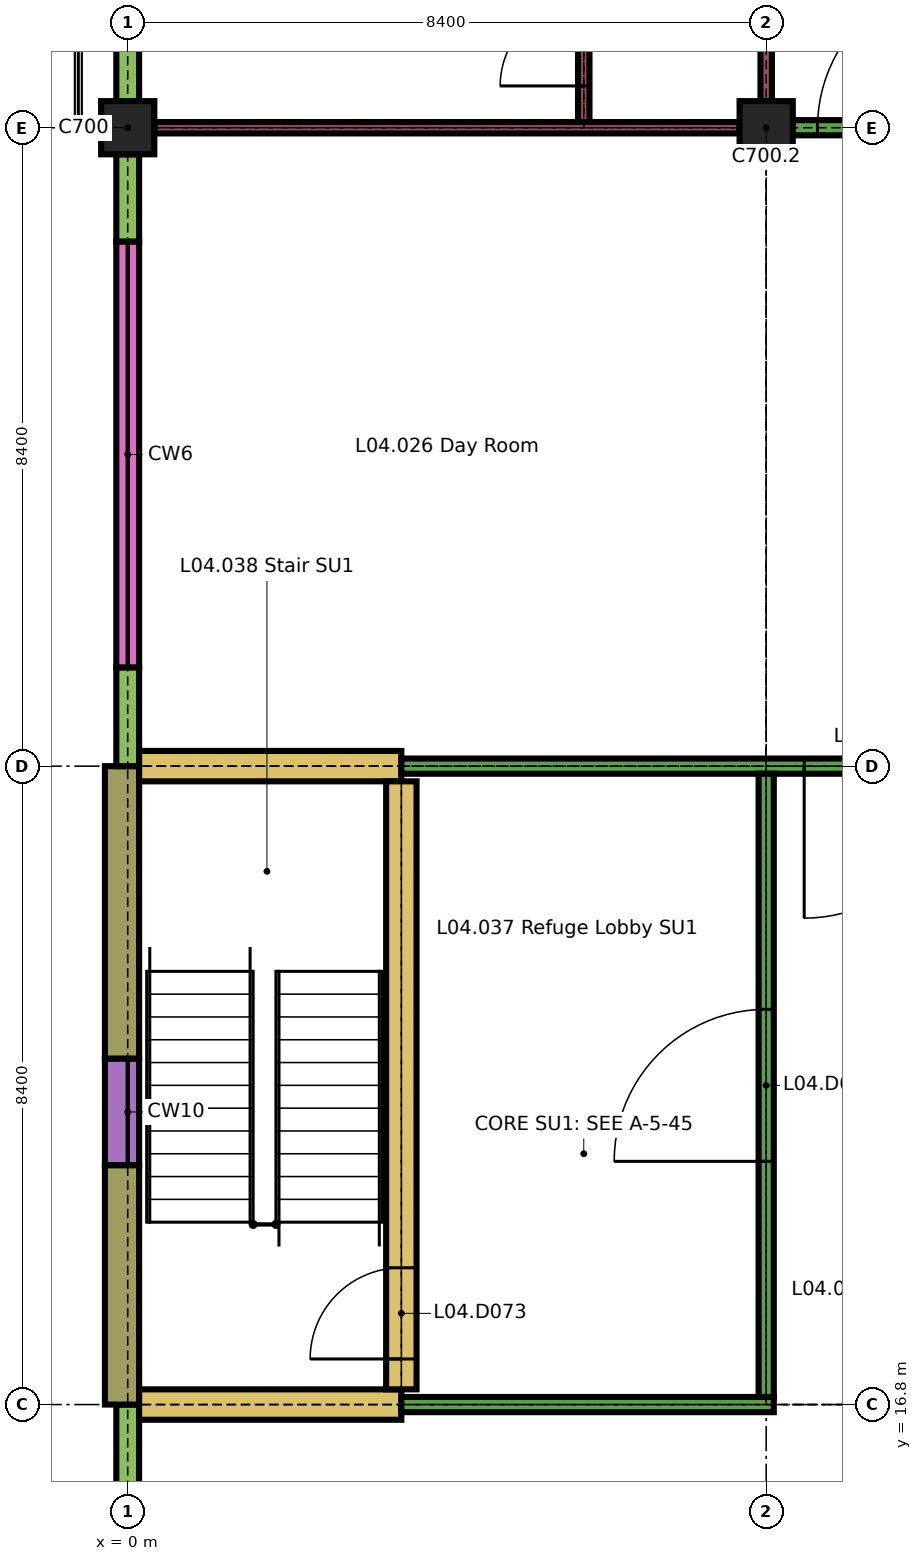
"""IFC4 building model, lengths in metres.
Left out: names, types, materials, properties, quantities, classifications, styles, units other than length and angle.
Written with IfcOpenShell. Run it as: python <this file> out.ifc"""

import sys

from ifc_helpers import new_model, si_unit, direction, frame, frame_2d, origin, origin_2d, place, context, subcontext, project, spatial, rectangle, extrude, element, fill, save


model = new_model("IFC4")
c1 = context("Model", 3, precision=1e-05, world=origin(), true_north=direction((0.0, 1.0)))
c2 = subcontext(c1, "Body", "Model", "MODEL_VIEW")
j1 = project(units=[si_unit("LENGTHUNIT", "METRE"), si_unit("PLANEANGLEUNIT", "RADIAN")], contexts=[c1])
p1 = place(None, origin())
s1 = spatial("IfcSite", under=j1, at=p1, CompositionType="ELEMENT")
p2 = place(p1, origin())
s2 = spatial("IfcBuilding", under=s1, at=p2, CompositionType="ELEMENT")
p3 = place(p2, frame((0.0, 0.0, 18.9)))
s3 = spatial("IfcBuildingStorey", under=s2, at=p3, CompositionType="ELEMENT", Elevation=18.9)
for number, where, z_axis, x_axis in (
    (1, (0.0, 33.6, 0.0), (0.0, 0.0, 1.0), (1.0, 0.0, 0.0)),
    (2, (8.4, 33.6, 0.0), (0.0, 0.0, 1.0), (1.0, 0.0, 0.0)),
):
    element("IfcColumn", number, at=place(p3, frame(where, z_axis=z_axis, x_axis=x_axis)), inside=s3, PredefinedType="COLUMN", context=c2, shape_type="SweptSolid", body=[
        extrude(rectangle(XDim=0.7, YDim=0.7, at=origin_2d()), origin(), (0.0, 0.0, 1.0), 3.26),
    ])
p4 = place(p3, frame((0.0, 13.8, 0.0), z_axis=(0.0, 0.0, 1.0), x_axis=(0.0, 1.0, 0.0)))
e3 = element("IfcWall", 3, at=p4, inside=s3, PredefinedType="SOLIDWALL", context=c2, shape_type="SweptSolid", body=[
    extrude(rectangle(XDim=3.0, YDim=0.3, at=frame_2d((1.5, 0.0))), origin(), (0.0, 0.0, 1.0), 2.96),
])
p5 = place(p4, frame((0.45, 0.0, 0.9)))
e4 = element("IfcOpeningElement", 4, at=p5, cuts=e3, PredefinedType="OPENING", context=c2, shape_type="SweptSolid", body=[
    extrude(rectangle(XDim=0.9, YDim=1.5, at=frame_2d((0.45, 0.75))), frame((0.0, 0.16, 0.0), z_axis=(0.0, -1.0, 0.0), x_axis=(1.0, 0.0, 0.0)), (0.0, 0.0, 1.0), 0.32),
])
p6 = place(p3, frame((-0.075, 16.8, 0.0), z_axis=(0.0, 0.0, 1.0), x_axis=(0.0, 1.0, 0.0)))
e5 = element("IfcWall", 5, at=p6, inside=s3, PredefinedType="SOLIDWALL", context=c2, shape_type="SweptSolid", body=[
    extrude(rectangle(XDim=3.15, YDim=0.45, at=frame_2d((1.575, 0.0))), origin(), (0.0, 0.0, 1.0), 3.26),
])
p7 = place(p3, frame((-0.075, 21.35, 0.0), z_axis=(0.0, 0.0, 1.0), x_axis=(0.0, 1.0, 0.0)))
e6 = element("IfcWall", 6, at=p7, inside=s3, PredefinedType="SOLIDWALL", context=c2, shape_type="SweptSolid", body=[
    extrude(rectangle(XDim=3.85, YDim=0.45, at=frame_2d((1.925, 0.0))), origin(), (0.0, 0.0, 1.0), 3.26),
])
p8 = place(p3, frame((-0.075, 19.95, 0.0), z_axis=(0.0, 0.0, 1.0), x_axis=(0.0, 1.0, 0.0)))
e7 = element("IfcWall", 7, at=p8, inside=s3, PredefinedType="SOLIDWALL", context=c2, shape_type="SweptSolid", body=[
    extrude(rectangle(XDim=1.4, YDim=0.45, at=frame_2d((0.7, 0.0))), origin(), (0.0, 0.0, 1.0), 0.6),
])
p9 = place(p3, frame((0.0, 25.2, 0.0), z_axis=(0.0, 0.0, 1.0), x_axis=(0.0, 1.0, 0.0)))
e8 = element("IfcWall", 8, at=p9, inside=s3, PredefinedType="SOLIDWALL", context=c2, shape_type="SweptSolid", body=[
    extrude(rectangle(XDim=1.3, YDim=0.3, at=frame_2d((0.65, 0.0))), origin(), (0.0, 0.0, 1.0), 2.96),
])
p10 = place(p3, frame((0.0, 32.1, 0.0), z_axis=(0.0, 0.0, 1.0), x_axis=(0.0, 1.0, 0.0)))
e9 = element("IfcWall", 9, at=p10, inside=s3, PredefinedType="SOLIDWALL", context=c2, shape_type="SweptSolid", body=[
    extrude(rectangle(XDim=1.15, YDim=0.3, at=frame_2d((0.575, 0.0))), origin(), (0.0, 0.0, 1.0), 2.96),
])
p11 = place(p3, frame((0.0, 26.5, 0.0), z_axis=(0.0, 0.0, 1.0), x_axis=(0.0, 1.0, 0.0)))
e10 = element("IfcWall", 10, at=p11, inside=s3, PredefinedType="SOLIDWALL", context=c2, shape_type="SweptSolid", body=[
    extrude(rectangle(XDim=5.6, YDim=0.3, at=frame_2d((2.8, 0.0))), origin(), (0.0, 0.0, 1.0), 0.6),
])
p12 = place(p3, frame((0.0, 33.95, 0.0), z_axis=(0.0, 0.0, 1.0), x_axis=(0.0, 1.0, 0.0)))
e11 = element("IfcWall", 11, at=p12, inside=s3, PredefinedType="SOLIDWALL", context=c2, shape_type="SweptSolid", body=[
    extrude(rectangle(XDim=3.85, YDim=0.3, at=frame_2d((1.925, 0.0))), origin(), (0.0, 0.0, 1.0), 2.96),
])
p13 = place(p12, frame((0.7, 0.0, 0.9)))
e12 = element("IfcOpeningElement", 12, at=p13, cuts=e11, PredefinedType="OPENING", context=c2, shape_type="SweptSolid", body=[
    extrude(rectangle(XDim=2.1, YDim=1.5, at=frame_2d((1.05, 0.75))), frame((0.0, 0.16, 0.0), z_axis=(0.0, -1.0, 0.0), x_axis=(1.0, 0.0, 0.0)), (0.0, 0.0, 1.0), 0.32),
])
p14 = place(p3, frame((0.15, 16.8, 0.0), z_axis=(0.0, 0.0, 1.0), x_axis=(1.0, 0.0, 0.0)))
e13 = element("IfcWall", 13, at=p14, inside=s3, PredefinedType="SHEAR", context=c2, shape_type="SweptSolid", body=[
    extrude(rectangle(XDim=3.45, YDim=0.4, at=frame_2d((1.725, 0.0))), origin(), (0.0, 0.0, 1.0), 3.26),
])
p15 = place(p3, frame((3.6, 16.8, 0.0), z_axis=(0.0, 0.0, 1.0), x_axis=(1.0, 0.0, 0.0)))
e14 = element("IfcWall", 14, at=p15, inside=s3, PredefinedType="PARTITIONING", context=c2, shape_type="SweptSolid", body=[
    extrude(rectangle(XDim=4.9, YDim=0.2, at=frame_2d((2.45, 0.0))), origin(), (0.0, 0.0, 1.0), 3.26),
])
p16 = place(p3, frame((0.15, 25.2, 0.0), z_axis=(0.0, 0.0, 1.0), x_axis=(1.0, 0.0, 0.0)))
e15 = element("IfcWall", 15, at=p16, inside=s3, PredefinedType="SHEAR", context=c2, shape_type="SweptSolid", body=[
    extrude(rectangle(XDim=3.45, YDim=0.4, at=frame_2d((1.725, 0.0))), origin(), (0.0, 0.0, 1.0), 3.26),
])
p17 = place(p3, frame((3.6, 25.2, 0.0), z_axis=(0.0, 0.0, 1.0), x_axis=(1.0, 0.0, 0.0)))
e16 = element("IfcWall", 16, at=p17, inside=s3, PredefinedType="PARTITIONING", context=c2, shape_type="SweptSolid", body=[
    extrude(rectangle(XDim=13.2, YDim=0.2, at=frame_2d((6.6, 0.0))), origin(), (0.0, 0.0, 1.0), 3.26),
])
p18 = place(p17, frame((5.3, 0.0, 0.0)))
e17 = element("IfcOpeningElement", 17, at=p18, cuts=e16, PredefinedType="OPENING", context=c2, shape_type="SweptSolid", body=[
    extrude(rectangle(XDim=2.0, YDim=2.4, at=frame_2d((1.0, 1.2))), frame((0.0, 0.11, 0.0), z_axis=(0.0, -1.0, 0.0), x_axis=(1.0, 0.0, 0.0)), (0.0, 0.0, 1.0), 0.22),
])
p19 = place(p17, frame((10.7, 0.0, 0.0)))
e18 = element("IfcOpeningElement", 18, at=p19, cuts=e16, PredefinedType="OPENING", context=c2, shape_type="SweptSolid", body=[
    extrude(rectangle(XDim=2.0, YDim=2.4, at=frame_2d((1.0, 1.2))), frame((0.0, 0.11, 0.0), z_axis=(0.0, -1.0, 0.0), x_axis=(1.0, 0.0, 0.0)), (0.0, 0.0, 1.0), 0.22),
])
p20 = place(p3, frame((0.35, 33.6, 0.0), z_axis=(0.0, 0.0, 1.0), x_axis=(1.0, 0.0, 0.0)))
e19 = element("IfcWall", 19, at=p20, inside=s3, PredefinedType="PARTITIONING", context=c2, shape_type="SweptSolid", body=[
    extrude(rectangle(XDim=7.7, YDim=0.15, at=frame_2d((3.85, 0.0))), origin(), (0.0, 0.0, 1.0), 3.26),
])
p21 = place(p3, frame((8.75, 33.6, 0.0), z_axis=(0.0, 0.0, 1.0), x_axis=(1.0, 0.0, 0.0)))
e20 = element("IfcWall", 20, at=p21, inside=s3, PredefinedType="PARTITIONING", context=c2, shape_type="SweptSolid", body=[
    extrude(rectangle(XDim=7.7, YDim=0.2, at=frame_2d((3.85, 0.0))), origin(), (0.0, 0.0, 1.0), 3.26),
])
p22 = place(p21, frame((0.325, 0.0, 0.0)))
e21 = element("IfcOpeningElement", 21, at=p22, cuts=e20, PredefinedType="OPENING", context=c2, shape_type="SweptSolid", body=[
    extrude(rectangle(XDim=2.0, YDim=2.4, at=frame_2d((1.0, 1.2))), frame((0.0, 0.11, 0.0), z_axis=(0.0, -1.0, 0.0), x_axis=(1.0, 0.0, 0.0)), (0.0, 0.0, 1.0), 0.22),
])
p23 = place(p21, frame((5.375, 0.0, 0.0)))
e22 = element("IfcOpeningElement", 22, at=p23, cuts=e20, PredefinedType="OPENING", context=c2, shape_type="SweptSolid", body=[
    extrude(rectangle(XDim=2.0, YDim=2.4, at=frame_2d((1.0, 1.2))), frame((0.0, 0.11, 0.0), z_axis=(0.0, -1.0, 0.0), x_axis=(1.0, 0.0, 0.0)), (0.0, 0.0, 1.0), 0.22),
])
p24 = place(p3, frame((3.6, 17.0, 0.0), z_axis=(0.0, 0.0, 1.0), x_axis=(0.0, 1.0, 0.0)))
e23 = element("IfcWall", 23, at=p24, inside=s3, PredefinedType="SHEAR", context=c2, shape_type="SweptSolid", body=[
    extrude(rectangle(XDim=8.0, YDim=0.4, at=frame_2d((4.0, 0.0))), origin(), (0.0, 0.0, 1.0), 3.26),
])
p25 = place(p24, frame((0.4, 0.0, 0.0)))
e24 = element("IfcOpeningElement", 24, at=p25, cuts=e23, PredefinedType="OPENING", context=c2, shape_type="SweptSolid", body=[
    extrude(rectangle(XDim=1.2, YDim=2.1, at=frame_2d((0.6, 1.05))), frame((0.0, 0.21, 0.0), z_axis=(0.0, -1.0, 0.0), x_axis=(1.0, 0.0, 0.0)), (0.0, 0.0, 1.0), 0.42),
])
p26 = place(p3, frame((6.0, 33.675, 0.0), z_axis=(0.0, 0.0, 1.0), x_axis=(0.0, 1.0, 0.0)))
e25 = element("IfcWall", 25, at=p26, inside=s3, PredefinedType="PARTITIONING", context=c2, shape_type="SweptSolid", body=[
    extrude(rectangle(XDim=2.05, YDim=0.15, at=frame_2d((1.025, 0.0))), origin(), (0.0, 0.0, 1.0), 3.26),
])
p27 = place(p26, frame((0.475, 0.0, 0.0)))
e26 = element("IfcOpeningElement", 26, at=p27, cuts=e25, PredefinedType="OPENING", context=c2, shape_type="SweptSolid", body=[
    extrude(rectangle(XDim=1.1, YDim=2.1, at=frame_2d((0.55, 1.05))), frame((0.0, 0.085, 0.0), z_axis=(0.0, -1.0, 0.0), x_axis=(1.0, 0.0, 0.0)), (0.0, 0.0, 1.0), 0.17),
])
p28 = place(p3, frame((8.4, 16.9, 0.0), z_axis=(0.0, 0.0, 1.0), x_axis=(0.0, 1.0, 0.0)))
e27 = element("IfcWall", 27, at=p28, inside=s3, PredefinedType="PARTITIONING", context=c2, shape_type="SweptSolid", body=[
    extrude(rectangle(XDim=8.2, YDim=0.2, at=frame_2d((4.1, 0.0))), origin(), (0.0, 0.0, 1.0), 3.26),
])
p29 = place(p28, frame((3.1, 0.0, 0.0)))
e28 = element("IfcOpeningElement", 28, at=p29, cuts=e27, PredefinedType="OPENING", context=c2, shape_type="SweptSolid", body=[
    extrude(rectangle(XDim=2.0, YDim=2.4, at=frame_2d((1.0, 1.2))), frame((0.0, 0.11, 0.0), z_axis=(0.0, -1.0, 0.0), x_axis=(1.0, 0.0, 0.0)), (0.0, 0.0, 1.0), 0.22),
])
p30 = place(p3, frame((8.4, 33.95, 0.0), z_axis=(0.0, 0.0, 1.0), x_axis=(0.0, 1.0, 0.0)))
e29 = element("IfcWall", 29, at=p30, inside=s3, PredefinedType="PARTITIONING", context=c2, shape_type="SweptSolid", body=[
    extrude(rectangle(XDim=7.7, YDim=0.15, at=frame_2d((3.85, 0.0))), origin(), (0.0, 0.0, 1.0), 3.26),
])
p31 = place(p30, frame((2.1, 0.0, 0.0)))
e30 = element("IfcOpeningElement", 30, at=p31, cuts=e29, PredefinedType="OPENING", context=c2, shape_type="SweptSolid", body=[
    extrude(rectangle(XDim=1.5, YDim=2.4, at=frame_2d((0.75, 1.2))), frame((0.0, 0.085, 0.0), z_axis=(0.0, -1.0, 0.0), x_axis=(1.0, 0.0, 0.0)), (0.0, 0.0, 1.0), 0.17),
])
p32 = place(p30, frame((4.1, 0.0, 0.0)))
e31 = element("IfcOpeningElement", 31, at=p32, cuts=e29, PredefinedType="OPENING", context=c2, shape_type="SweptSolid", body=[
    extrude(rectangle(XDim=1.5, YDim=2.4, at=frame_2d((0.75, 1.2))), frame((0.0, 0.085, 0.0), z_axis=(0.0, -1.0, 0.0), x_axis=(1.0, 0.0, 0.0)), (0.0, 0.0, 1.0), 0.17),
])
p33 = place(p18, origin())
e32 = element("IfcDoor", 32, at=p33, inside=s3, OperationType="SINGLE_SWING_LEFT", PredefinedType="DOOR", context=c2, shape_type="SweptSolid", body=[
    extrude(rectangle(XDim=2.0, YDim=2.4, at=frame_2d((1.0, 1.2))), frame((0.0, 0.03, 0.0), z_axis=(0.0, -1.0, 0.0), x_axis=(1.0, 0.0, 0.0)), (0.0, 0.0, 1.0), 0.06),
])
fill(e17, e32)
p34 = place(p22, origin())
e33 = element("IfcDoor", 33, at=p34, inside=s3, OperationType="SINGLE_SWING_LEFT", PredefinedType="DOOR", context=c2, shape_type="SweptSolid", body=[
    extrude(rectangle(XDim=2.0, YDim=2.4, at=frame_2d((1.0, 1.2))), frame((0.0, 0.03, 0.0), z_axis=(0.0, -1.0, 0.0), x_axis=(1.0, 0.0, 0.0)), (0.0, 0.0, 1.0), 0.06),
])
fill(e21, e33)
p35 = place(p25, origin())
e34 = element("IfcDoor", 34, at=p35, inside=s3, OperationType="SINGLE_SWING_RIGHT", PredefinedType="DOOR", context=c2, shape_type="SweptSolid", body=[
    extrude(rectangle(XDim=1.2, YDim=2.1, at=frame_2d((0.6, 1.05))), frame((0.0, 0.025, 0.0), z_axis=(0.0, -1.0, 0.0), x_axis=(1.0, 0.0, 0.0)), (0.0, 0.0, 1.0), 0.05),
])
fill(e24, e34)
p36 = place(p27, origin())
e35 = element("IfcDoor", 35, at=p36, inside=s3, OperationType="SINGLE_SWING_RIGHT", PredefinedType="DOOR", context=c2, shape_type="SweptSolid", body=[
    extrude(rectangle(XDim=1.1, YDim=2.1, at=frame_2d((0.55, 1.05))), frame((0.0, 0.025, 0.0), z_axis=(0.0, -1.0, 0.0), x_axis=(1.0, 0.0, 0.0)), (0.0, 0.0, 1.0), 0.05),
])
fill(e26, e35)
p37 = place(p29, origin())
e36 = element("IfcDoor", 36, at=p37, inside=s3, OperationType="SINGLE_SWING_RIGHT", PredefinedType="DOOR", context=c2, shape_type="SweptSolid", body=[
    extrude(rectangle(XDim=2.0, YDim=2.4, at=frame_2d((1.0, 1.2))), frame((0.0, 0.03, 0.0), z_axis=(0.0, -1.0, 0.0), x_axis=(1.0, 0.0, 0.0)), (0.0, 0.0, 1.0), 0.06),
])
fill(e28, e36)
save(model, sys.argv[1])
